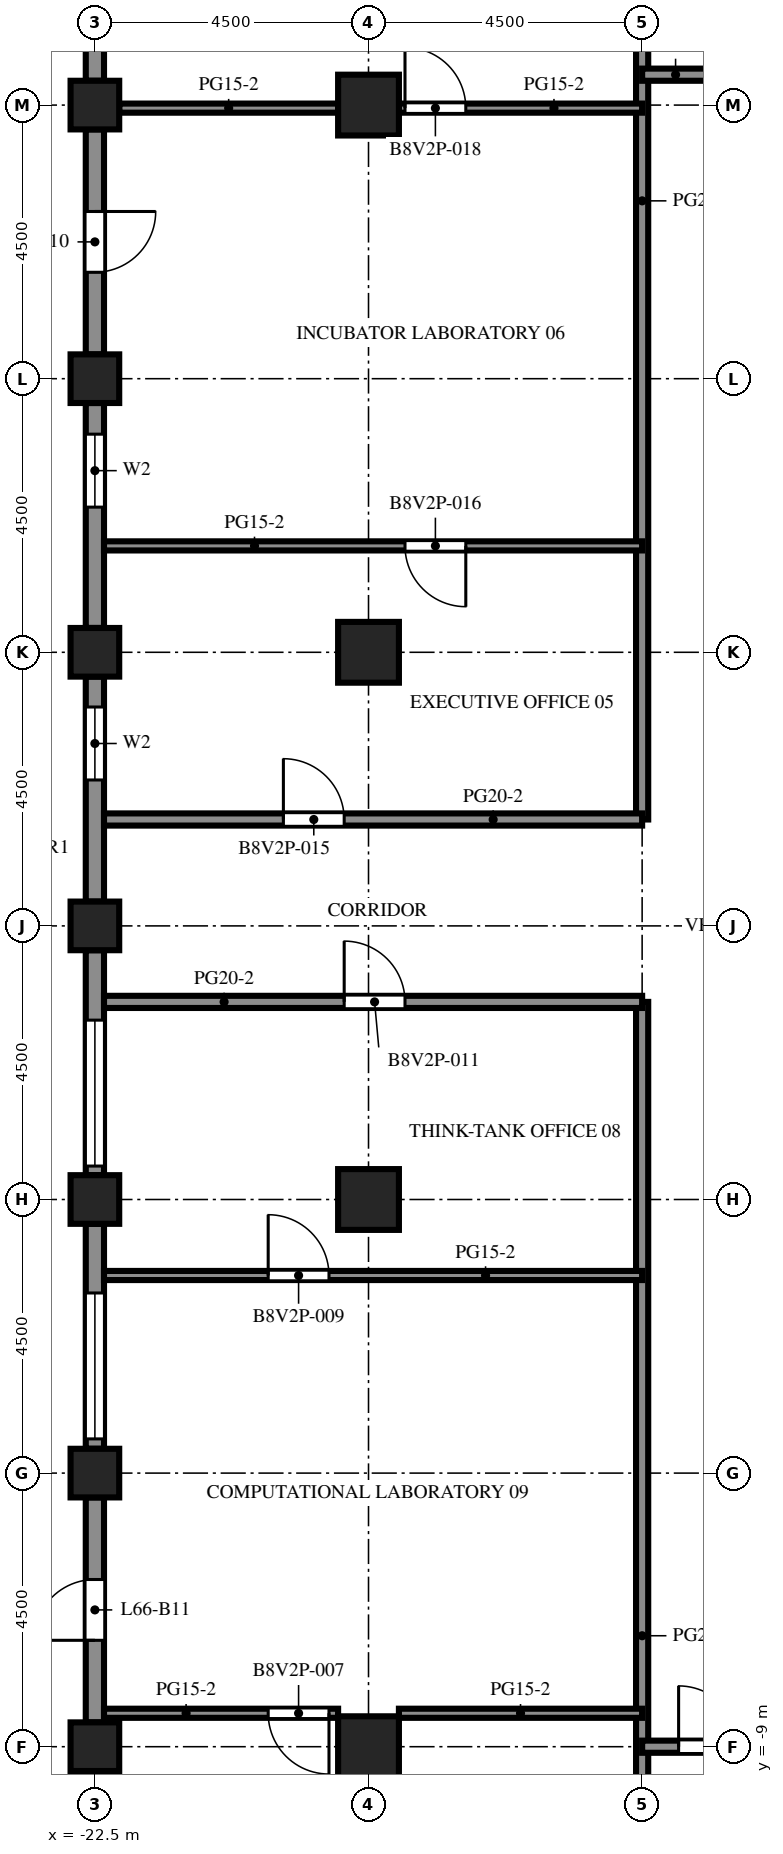
"""IFC4 building model, lengths in metres.
Left out: names, types, materials, properties, quantities, classifications, styles, units other than length and angle.
Written with IfcOpenShell. Run it as: python <this file> out.ifc"""

import sys

from ifc_helpers import new_model, si_unit, direction, frame, frame_2d, origin, origin_2d, place, context, subcontext, project, spatial, rectangle, extrude, element, fill, save


model = new_model("IFC4")
c1 = context("Model", 3, precision=1e-05, world=origin(), true_north=direction((0.0, 1.0)))
c2 = subcontext(c1, "Body", "Model", "MODEL_VIEW")
j1 = project(units=[si_unit("LENGTHUNIT", "METRE"), si_unit("PLANEANGLEUNIT", "RADIAN")], contexts=[c1])
p1 = place(None, origin())
s1 = spatial("IfcSite", under=j1, at=p1, CompositionType="ELEMENT")
p2 = place(p1, origin())
s2 = spatial("IfcBuilding", under=s1, at=p2, CompositionType="ELEMENT")
p3 = place(p2, frame((0.0, 0.0, 290.9)))
s3 = spatial("IfcBuildingStorey", under=s2, at=p3, CompositionType="ELEMENT", Elevation=290.9)
for number, where, z_axis, x_axis in (
    (1, (-22.5, -9.0, 0.0), (0.0, 0.0, 1.0), (1.0, 0.0, 0.0)),
    (2, (-22.5, -4.5, 0.0), (0.0, 0.0, 1.0), (1.0, 0.0, 0.0)),
    (3, (-22.5, 0.0, 0.0), (0.0, 0.0, 1.0), (1.0, 0.0, 0.0)),
    (4, (-22.5, 4.5, 0.0), (0.0, 0.0, 1.0), (1.0, 0.0, 0.0)),
    (5, (-22.5, 9.0, 0.0), (0.0, 0.0, 1.0), (1.0, 0.0, 0.0)),
    (6, (-22.5, 13.5, 0.0), (0.0, 0.0, 1.0), (1.0, 0.0, 0.0)),
    (7, (-22.5, 18.0, 0.0), (0.0, 0.0, 1.0), (1.0, 0.0, 0.0)),
):
    element("IfcColumn", number, at=place(p3, frame(where, z_axis=z_axis, x_axis=x_axis)), inside=s3, PredefinedType="COLUMN", context=c2, shape_type="SweptSolid", body=[
        extrude(rectangle(XDim=0.8, YDim=0.8, at=origin_2d()), origin(), (0.0, 0.0, 1.0), 4.1),
    ])
for number, where, z_axis, x_axis in (
    (8, (-18.0, -9.0, 0.0), (0.0, 0.0, 1.0), (1.0, 0.0, 0.0)),
    (9, (-18.0, 0.0, 0.0), (0.0, 0.0, 1.0), (1.0, 0.0, 0.0)),
    (10, (-18.0, 9.0, 0.0), (0.0, 0.0, 1.0), (1.0, 0.0, 0.0)),
    (11, (-18.0, 18.0, 0.0), (0.0, 0.0, 1.0), (1.0, 0.0, 0.0)),
):
    element("IfcColumn", number, at=place(p3, frame(where, z_axis=z_axis, x_axis=x_axis)), inside=s3, PredefinedType="COLUMN", context=c2, shape_type="SweptSolid", body=[
        extrude(rectangle(XDim=1.0, YDim=1.0, at=origin_2d()), origin(), (0.0, 0.0, 1.0), 4.1),
    ])
p4 = place(p3, frame((-22.5, 18.4, 0.0), z_axis=(0.0, 0.0, 1.0), x_axis=(0.0, 1.0, 0.0)))
e12 = element("IfcWall", 12, at=p4, inside=s3, PredefinedType="SOLIDWALL", context=c2, shape_type="SweptSolid", body=[
    extrude(rectangle(XDim=3.7, YDim=0.3, at=frame_2d((1.85, 0.0))), origin(), (0.0, 0.0, 1.0), 2.7),
])
p5 = place(p4, frame((0.65, 0.0, 0.8)))
e13 = element("IfcOpeningElement", 13, at=p5, cuts=e12, PredefinedType="OPENING", context=c2, shape_type="SweptSolid", body=[
    extrude(rectangle(XDim=2.4, YDim=1.7, at=frame_2d((1.2, 0.85))), frame((0.0, 0.16, 0.0), z_axis=(0.0, -1.0, 0.0), x_axis=(1.0, 0.0, 0.0)), (0.0, 0.0, 1.0), 0.32),
])
p6 = place(p3, frame((-22.5, 13.9, 0.0), z_axis=(0.0, 0.0, 1.0), x_axis=(0.0, 1.0, 0.0)))
e14 = element("IfcWall", 14, at=p6, inside=s3, PredefinedType="SOLIDWALL", context=c2, shape_type="SweptSolid", body=[
    extrude(rectangle(XDim=3.7, YDim=0.3, at=frame_2d((1.85, 0.0))), origin(), (0.0, 0.0, 1.0), 2.7),
])
p7 = place(p6, frame((1.35, 0.0, 0.0)))
e15 = element("IfcOpeningElement", 15, at=p7, cuts=e14, PredefinedType="OPENING", context=c2, shape_type="SweptSolid", body=[
    extrude(rectangle(XDim=1.0, YDim=2.2, at=frame_2d((0.5, 1.1))), frame((0.0, 0.16, 0.0), z_axis=(0.0, -1.0, 0.0), x_axis=(1.0, 0.0, 0.0)), (0.0, 0.0, 1.0), 0.32),
])
p8 = place(p3, frame((-22.5, 9.4, 0.0), z_axis=(0.0, 0.0, 1.0), x_axis=(0.0, 1.0, 0.0)))
e16 = element("IfcWall", 16, at=p8, inside=s3, PredefinedType="SOLIDWALL", context=c2, shape_type="SweptSolid", body=[
    extrude(rectangle(XDim=3.7, YDim=0.3, at=frame_2d((1.85, 0.0))), origin(), (0.0, 0.0, 1.0), 2.7),
])
p9 = place(p8, frame((1.988, 0.0, 0.8)))
e17 = element("IfcOpeningElement", 17, at=p9, cuts=e16, PredefinedType="OPENING", context=c2, shape_type="SweptSolid", body=[
    extrude(rectangle(XDim=1.2, YDim=1.7, at=frame_2d((0.6, 0.85))), frame((0.0, 0.16, 0.0), z_axis=(0.0, -1.0, 0.0), x_axis=(1.0, 0.0, 0.0)), (0.0, 0.0, 1.0), 0.32),
])
p10 = place(p3, frame((-22.5, 4.9, 0.0), z_axis=(0.0, 0.0, 1.0), x_axis=(0.0, 1.0, 0.0)))
e18 = element("IfcWall", 18, at=p10, inside=s3, PredefinedType="SOLIDWALL", context=c2, shape_type="SweptSolid", body=[
    extrude(rectangle(XDim=3.7, YDim=0.3, at=frame_2d((1.85, 0.0))), origin(), (0.0, 0.0, 1.0), 2.7),
])
p11 = place(p10, frame((2.0, 0.0, 0.8)))
e19 = element("IfcOpeningElement", 19, at=p11, cuts=e18, PredefinedType="OPENING", context=c2, shape_type="SweptSolid", body=[
    extrude(rectangle(XDim=1.2, YDim=1.7, at=frame_2d((0.6, 0.85))), frame((0.0, 0.16, 0.0), z_axis=(0.0, -1.0, 0.0), x_axis=(1.0, 0.0, 0.0)), (0.0, 0.0, 1.0), 0.32),
])
p12 = place(p3, frame((-22.5, 0.4, 0.0), z_axis=(0.0, 0.0, 1.0), x_axis=(0.0, 1.0, 0.0)))
e20 = element("IfcWall", 20, at=p12, inside=s3, PredefinedType="SOLIDWALL", context=c2, shape_type="SweptSolid", body=[
    extrude(rectangle(XDim=3.7, YDim=0.3, at=frame_2d((1.85, 0.0))), origin(), (0.0, 0.0, 1.0), 2.7),
])
p13 = place(p12, frame((0.15, 0.0, 0.8)))
e21 = element("IfcOpeningElement", 21, at=p13, cuts=e20, PredefinedType="OPENING", context=c2, shape_type="SweptSolid", body=[
    extrude(rectangle(XDim=2.4, YDim=1.7, at=frame_2d((1.2, 0.85))), frame((0.0, 0.16, 0.0), z_axis=(0.0, -1.0, 0.0), x_axis=(1.0, 0.0, 0.0)), (0.0, 0.0, 1.0), 0.32),
])
p14 = place(p3, frame((-22.5, -4.1, 0.0), z_axis=(0.0, 0.0, 1.0), x_axis=(0.0, 1.0, 0.0)))
e22 = element("IfcWall", 22, at=p14, inside=s3, PredefinedType="SOLIDWALL", context=c2, shape_type="SweptSolid", body=[
    extrude(rectangle(XDim=3.7, YDim=0.3, at=frame_2d((1.85, 0.0))), origin(), (0.0, 0.0, 1.0), 2.7),
])
p15 = place(p14, frame((0.163, 0.0, 0.8)))
e23 = element("IfcOpeningElement", 23, at=p15, cuts=e22, PredefinedType="OPENING", context=c2, shape_type="SweptSolid", body=[
    extrude(rectangle(XDim=2.4, YDim=1.7, at=frame_2d((1.2, 0.85))), frame((0.0, 0.16, 0.0), z_axis=(0.0, -1.0, 0.0), x_axis=(1.0, 0.0, 0.0)), (0.0, 0.0, 1.0), 0.32),
])
p16 = place(p3, frame((-22.5, -8.6, 0.0), z_axis=(0.0, 0.0, 1.0), x_axis=(0.0, 1.0, 0.0)))
e24 = element("IfcWall", 24, at=p16, inside=s3, PredefinedType="SOLIDWALL", context=c2, shape_type="SweptSolid", body=[
    extrude(rectangle(XDim=3.7, YDim=0.3, at=frame_2d((1.85, 0.0))), origin(), (0.0, 0.0, 1.0), 2.7),
])
p17 = place(p16, frame((1.35, 0.0, 0.0)))
e25 = element("IfcOpeningElement", 25, at=p17, cuts=e24, PredefinedType="OPENING", context=c2, shape_type="SweptSolid", body=[
    extrude(rectangle(XDim=1.0, YDim=2.2, at=frame_2d((0.5, 1.1))), frame((0.0, 0.16, 0.0), z_axis=(0.0, -1.0, 0.0), x_axis=(1.0, 0.0, 0.0)), (0.0, 0.0, 1.0), 0.32),
])
p18 = place(p3, frame((-22.5, -13.1, 0.0), z_axis=(0.0, 0.0, 1.0), x_axis=(0.0, 1.0, 0.0)))
e26 = element("IfcWall", 26, at=p18, inside=s3, PredefinedType="SOLIDWALL", context=c2, shape_type="SweptSolid", body=[
    extrude(rectangle(XDim=3.7, YDim=0.3, at=frame_2d((1.85, 0.0))), origin(), (0.0, 0.0, 1.0), 2.7),
])
p19 = place(p18, frame((0.65, 0.0, 0.8)))
e27 = element("IfcOpeningElement", 27, at=p19, cuts=e26, PredefinedType="OPENING", context=c2, shape_type="SweptSolid", body=[
    extrude(rectangle(XDim=2.4, YDim=1.7, at=frame_2d((1.2, 0.85))), frame((0.0, 0.16, 0.0), z_axis=(0.0, -1.0, 0.0), x_axis=(1.0, 0.0, 0.0)), (0.0, 0.0, 1.0), 0.32),
])
p20 = place(p3, frame((-13.5, -17.6, 0.0), z_axis=(0.0, 0.0, 1.0), x_axis=(0.0, 1.0, 0.0)))
e28 = element("IfcWall", 28, at=p20, inside=s3, PredefinedType="PARTITIONING", context=c2, shape_type="SweptSolid", body=[
    extrude(rectangle(XDim=20.85, YDim=0.2, at=frame_2d((10.425, 0.0))), origin(), (0.0, 0.0, 1.0), 3.5),
])
p21 = place(p3, frame((-13.5, 6.25, 0.0), z_axis=(0.0, 0.0, 1.0), x_axis=(0.0, 1.0, 0.0)))
e29 = element("IfcWall", 29, at=p21, inside=s3, PredefinedType="PARTITIONING", context=c2, shape_type="SweptSolid", body=[
    extrude(rectangle(XDim=20.35, YDim=0.2, at=frame_2d((10.175, 0.0))), origin(), (0.0, 0.0, 1.0), 3.5),
])
p22 = place(p3, frame((-10.5, -9.0, 0.0), z_axis=(0.0, 0.0, 1.0), x_axis=(-1.0, 0.0, 0.0)))
e30 = element("IfcWall", 30, at=p22, inside=s3, PredefinedType="PARTITIONING", context=c2, shape_type="SweptSolid", body=[
    extrude(rectangle(XDim=3.0, YDim=0.2, at=frame_2d((1.5, 0.0))), origin(), (0.0, 0.0, 1.0), 3.5),
])
p23 = place(p22, frame((1.4, 0.0, 0.0)))
e31 = element("IfcOpeningElement", 31, at=p23, cuts=e30, PredefinedType="OPENING", context=c2, shape_type="SweptSolid", body=[
    extrude(rectangle(XDim=1.0, YDim=2.1, at=frame_2d((0.5, 1.05))), frame((0.0, 0.11, 0.0), z_axis=(0.0, -1.0, 0.0), x_axis=(1.0, 0.0, 0.0)), (0.0, 0.0, 1.0), 0.22),
])
p24 = place(p3, frame((-18.5, -8.45, 0.0), z_axis=(0.0, 0.0, 1.0), x_axis=(-1.0, 0.0, 0.0)))
e32 = element("IfcWall", 32, at=p24, inside=s3, PredefinedType="PARTITIONING", context=c2, shape_type="SweptSolid", body=[
    extrude(rectangle(XDim=3.85, YDim=0.15, at=frame_2d((1.925, 0.0))), origin(), (0.0, 0.0, 1.0), 3.5),
])
p25 = place(p24, frame((0.15, 0.0, 0.0)))
e33 = element("IfcOpeningElement", 33, at=p25, cuts=e32, PredefinedType="OPENING", context=c2, shape_type="SweptSolid", body=[
    extrude(rectangle(XDim=1.0, YDim=2.1, at=frame_2d((0.5, 1.05))), frame((0.0, 0.085, 0.0), z_axis=(0.0, -1.0, 0.0), x_axis=(1.0, 0.0, 0.0)), (0.0, 0.0, 1.0), 0.17),
])
p26 = place(p3, frame((-17.5, -8.45, 0.0), z_axis=(0.0, 0.0, 1.0), x_axis=(1.0, 0.0, 0.0)))
e34 = element("IfcWall", 34, at=p26, inside=s3, PredefinedType="PARTITIONING", context=c2, shape_type="SweptSolid", body=[
    extrude(rectangle(XDim=4.0, YDim=0.15, at=frame_2d((2.0, 0.0))), origin(), (0.0, 0.0, 1.0), 3.5),
])
p27 = place(p3, frame((-13.5, -1.25, 0.0), z_axis=(0.0, 0.0, 1.0), x_axis=(-1.0, 0.0, 0.0)))
e35 = element("IfcWall", 35, at=p27, inside=s3, PredefinedType="PARTITIONING", context=c2, shape_type="SweptSolid", body=[
    extrude(rectangle(XDim=8.85, YDim=0.15, at=frame_2d((4.425, 0.0))), origin(), (0.0, 0.0, 1.0), 3.5),
])
p28 = place(p27, frame((5.15, 0.0, 0.0)))
e36 = element("IfcOpeningElement", 36, at=p28, cuts=e35, PredefinedType="OPENING", context=c2, shape_type="SweptSolid", body=[
    extrude(rectangle(XDim=1.0, YDim=2.1, at=frame_2d((0.5, 1.05))), frame((0.0, 0.085, 0.0), z_axis=(0.0, -1.0, 0.0), x_axis=(1.0, 0.0, 0.0)), (0.0, 0.0, 1.0), 0.17),
])
p29 = place(p3, frame((-13.5, 3.25, 0.0), z_axis=(0.0, 0.0, 1.0), x_axis=(-1.0, 0.0, 0.0)))
e37 = element("IfcWall", 37, at=p29, inside=s3, PredefinedType="PARTITIONING", context=c2, shape_type="SweptSolid", body=[
    extrude(rectangle(XDim=8.85, YDim=0.2, at=frame_2d((4.425, 0.0))), origin(), (0.0, 0.0, 1.0), 3.5),
])
p30 = place(p29, frame((3.9, 0.0, 0.0)))
e38 = element("IfcOpeningElement", 38, at=p30, cuts=e37, PredefinedType="OPENING", context=c2, shape_type="SweptSolid", body=[
    extrude(rectangle(XDim=1.0, YDim=2.1, at=frame_2d((0.5, 1.05))), frame((0.0, 0.11, 0.0), z_axis=(0.0, -1.0, 0.0), x_axis=(1.0, 0.0, 0.0)), (0.0, 0.0, 1.0), 0.22),
])
p31 = place(p3, frame((-22.35, 6.25, 0.0), z_axis=(0.0, 0.0, 1.0), x_axis=(1.0, 0.0, 0.0)))
e39 = element("IfcWall", 39, at=p31, inside=s3, PredefinedType="PARTITIONING", context=c2, shape_type="SweptSolid", body=[
    extrude(rectangle(XDim=8.85, YDim=0.2, at=frame_2d((4.425, 0.0))), origin(), (0.0, 0.0, 1.0), 3.5),
])
p32 = place(p31, frame((2.95, 0.0, 0.0)))
e40 = element("IfcOpeningElement", 40, at=p32, cuts=e39, PredefinedType="OPENING", context=c2, shape_type="SweptSolid", body=[
    extrude(rectangle(XDim=1.0, YDim=2.1, at=frame_2d((0.5, 1.05))), frame((0.0, 0.11, 0.0), z_axis=(0.0, -1.0, 0.0), x_axis=(1.0, 0.0, 0.0)), (0.0, 0.0, 1.0), 0.22),
])
p33 = place(p3, frame((-22.35, 10.75, 0.0), z_axis=(0.0, 0.0, 1.0), x_axis=(1.0, 0.0, 0.0)))
e41 = element("IfcWall", 41, at=p33, inside=s3, PredefinedType="PARTITIONING", context=c2, shape_type="SweptSolid", body=[
    extrude(rectangle(XDim=8.85, YDim=0.15, at=frame_2d((4.425, 0.0))), origin(), (0.0, 0.0, 1.0), 3.5),
])
p34 = place(p33, frame((4.95, 0.0, 0.0)))
e42 = element("IfcOpeningElement", 42, at=p34, cuts=e41, PredefinedType="OPENING", context=c2, shape_type="SweptSolid", body=[
    extrude(rectangle(XDim=1.0, YDim=2.1, at=frame_2d((0.5, 1.05))), frame((0.0, 0.085, 0.0), z_axis=(0.0, -1.0, 0.0), x_axis=(1.0, 0.0, 0.0)), (0.0, 0.0, 1.0), 0.17),
])
p35 = place(p3, frame((-22.1, 17.95, 0.0), z_axis=(0.0, 0.0, 1.0), x_axis=(1.0, 0.0, 0.0)))
e43 = element("IfcWall", 43, at=p35, inside=s3, PredefinedType="PARTITIONING", context=c2, shape_type="SweptSolid", body=[
    extrude(rectangle(XDim=3.6, YDim=0.15, at=frame_2d((1.8, 0.0))), origin(), (0.0, 0.0, 1.0), 3.5),
])
p36 = place(p3, frame((-17.5, 17.95, 0.0), z_axis=(0.0, 0.0, 1.0), x_axis=(1.0, 0.0, 0.0)))
e44 = element("IfcWall", 44, at=p36, inside=s3, PredefinedType="PARTITIONING", context=c2, shape_type="SweptSolid", body=[
    extrude(rectangle(XDim=4.0, YDim=0.15, at=frame_2d((2.0, 0.0))), origin(), (0.0, 0.0, 1.0), 3.5),
])
p37 = place(p36, frame((0.1, 0.0, 0.0)))
e45 = element("IfcOpeningElement", 45, at=p37, cuts=e44, PredefinedType="OPENING", context=c2, shape_type="SweptSolid", body=[
    extrude(rectangle(XDim=1.0, YDim=2.1, at=frame_2d((0.5, 1.05))), frame((0.0, 0.085, 0.0), z_axis=(0.0, -1.0, 0.0), x_axis=(1.0, 0.0, 0.0)), (0.0, 0.0, 1.0), 0.17),
])
p38 = place(p3, frame((-13.5, 18.5, 0.0), z_axis=(0.0, 0.0, 1.0), x_axis=(1.0, 0.0, 0.0)))
e46 = element("IfcWall", 46, at=p38, inside=s3, PredefinedType="PARTITIONING", context=c2, shape_type="SweptSolid", body=[
    extrude(rectangle(XDim=3.0, YDim=0.2, at=frame_2d((1.5, 0.0))), origin(), (0.0, 0.0, 1.0), 3.5),
])
p39 = place(p38, frame((1.1, 0.0, 0.0)))
e47 = element("IfcOpeningElement", 47, at=p39, cuts=e46, PredefinedType="OPENING", context=c2, shape_type="SweptSolid", body=[
    extrude(rectangle(XDim=1.0, YDim=2.1, at=frame_2d((0.5, 1.05))), frame((0.0, 0.11, 0.0), z_axis=(0.0, -1.0, 0.0), x_axis=(1.0, 0.0, 0.0)), (0.0, 0.0, 1.0), 0.22),
])
p40 = place(p7, origin())
e48 = element("IfcDoor", 48, at=p40, inside=s3, OperationType="SINGLE_SWING_RIGHT", PredefinedType="DOOR", context=c2, shape_type="SweptSolid", body=[
    extrude(rectangle(XDim=1.0, YDim=2.2, at=frame_2d((0.5, 1.1))), frame((0.0, 0.025, 0.0), z_axis=(0.0, -1.0, 0.0), x_axis=(1.0, 0.0, 0.0)), (0.0, 0.0, 1.0), 0.05),
])
fill(e15, e48)
p41 = place(p9, origin())
e49 = element("IfcWindow", 49, at=p41, inside=s3, PartitioningType="SINGLE_PANEL", PredefinedType="WINDOW", context=c2, shape_type="SweptSolid", body=[
    extrude(rectangle(XDim=1.2, YDim=1.7, at=frame_2d((0.6, 0.85))), frame((0.0, 0.03, 0.0), z_axis=(0.0, -1.0, 0.0), x_axis=(1.0, 0.0, 0.0)), (0.0, 0.0, 1.0), 0.06),
])
fill(e17, e49)
p42 = place(p11, origin())
e50 = element("IfcWindow", 50, at=p42, inside=s3, PartitioningType="SINGLE_PANEL", PredefinedType="WINDOW", context=c2, shape_type="SweptSolid", body=[
    extrude(rectangle(XDim=1.2, YDim=1.7, at=frame_2d((0.6, 0.85))), frame((0.0, 0.03, 0.0), z_axis=(0.0, -1.0, 0.0), x_axis=(1.0, 0.0, 0.0)), (0.0, 0.0, 1.0), 0.06),
])
fill(e19, e50)
p43 = place(p13, origin())
e51 = element("IfcWindow", 51, at=p43, inside=s3, PartitioningType="SINGLE_PANEL", PredefinedType="WINDOW", context=c2, shape_type="SweptSolid", body=[
    extrude(rectangle(XDim=2.4, YDim=1.7, at=frame_2d((1.2, 0.85))), frame((0.0, 0.03, 0.0), z_axis=(0.0, -1.0, 0.0), x_axis=(1.0, 0.0, 0.0)), (0.0, 0.0, 1.0), 0.06),
])
fill(e21, e51)
p44 = place(p15, origin())
e52 = element("IfcWindow", 52, at=p44, inside=s3, PartitioningType="SINGLE_PANEL", PredefinedType="WINDOW", context=c2, shape_type="SweptSolid", body=[
    extrude(rectangle(XDim=2.4, YDim=1.7, at=frame_2d((1.2, 0.85))), frame((0.0, 0.03, 0.0), z_axis=(0.0, -1.0, 0.0), x_axis=(1.0, 0.0, 0.0)), (0.0, 0.0, 1.0), 0.06),
])
fill(e23, e52)
p45 = place(p17, origin())
e53 = element("IfcDoor", 53, at=p45, inside=s3, OperationType="SINGLE_SWING_LEFT", PredefinedType="DOOR", context=c2, shape_type="SweptSolid", body=[
    extrude(rectangle(XDim=1.0, YDim=2.2, at=frame_2d((0.5, 1.1))), frame((0.0, 0.025, 0.0), z_axis=(0.0, -1.0, 0.0), x_axis=(1.0, 0.0, 0.0)), (0.0, 0.0, 1.0), 0.05),
])
fill(e25, e53)
p46 = place(p23, origin())
e54 = element("IfcDoor", 54, at=p46, inside=s3, OperationType="SINGLE_SWING_RIGHT", PredefinedType="DOOR", context=c2, shape_type="SweptSolid", body=[
    extrude(rectangle(XDim=1.0, YDim=2.1, at=frame_2d((0.5, 1.05))), frame((0.0, 0.025, 0.0), z_axis=(0.0, -1.0, 0.0), x_axis=(1.0, 0.0, 0.0)), (0.0, 0.0, 1.0), 0.05),
])
fill(e31, e54)
p47 = place(p25, origin())
e55 = element("IfcDoor", 55, at=p47, inside=s3, OperationType="SINGLE_SWING_LEFT", PredefinedType="DOOR", context=c2, shape_type="SweptSolid", body=[
    extrude(rectangle(XDim=1.0, YDim=2.1, at=frame_2d((0.5, 1.05))), frame((0.0, 0.025, 0.0), z_axis=(0.0, -1.0, 0.0), x_axis=(1.0, 0.0, 0.0)), (0.0, 0.0, 1.0), 0.05),
])
fill(e33, e55)
p48 = place(p28, origin())
e56 = element("IfcDoor", 56, at=p48, inside=s3, OperationType="SINGLE_SWING_RIGHT", PredefinedType="DOOR", context=c2, shape_type="SweptSolid", body=[
    extrude(rectangle(XDim=1.0, YDim=2.1, at=frame_2d((0.5, 1.05))), frame((0.0, 0.025, 0.0), z_axis=(0.0, -1.0, 0.0), x_axis=(1.0, 0.0, 0.0)), (0.0, 0.0, 1.0), 0.05),
])
fill(e36, e56)
p49 = place(p30, origin())
e57 = element("IfcDoor", 57, at=p49, inside=s3, OperationType="SINGLE_SWING_RIGHT", PredefinedType="DOOR", context=c2, shape_type="SweptSolid", body=[
    extrude(rectangle(XDim=1.0, YDim=2.1, at=frame_2d((0.5, 1.05))), frame((0.0, 0.025, 0.0), z_axis=(0.0, -1.0, 0.0), x_axis=(1.0, 0.0, 0.0)), (0.0, 0.0, 1.0), 0.05),
])
fill(e38, e57)
p50 = place(p32, origin())
e58 = element("IfcDoor", 58, at=p50, inside=s3, OperationType="SINGLE_SWING_LEFT", PredefinedType="DOOR", context=c2, shape_type="SweptSolid", body=[
    extrude(rectangle(XDim=1.0, YDim=2.1, at=frame_2d((0.5, 1.05))), frame((0.0, 0.025, 0.0), z_axis=(0.0, -1.0, 0.0), x_axis=(1.0, 0.0, 0.0)), (0.0, 0.0, 1.0), 0.05),
])
fill(e40, e58)
p51 = place(p34, origin())
e59 = element("IfcDoor", 59, at=p51, inside=s3, OperationType="SINGLE_SWING_RIGHT", PredefinedType="DOOR", context=c2, shape_type="SweptSolid", body=[
    extrude(rectangle(XDim=1.0, YDim=2.1, at=frame_2d((0.5, 1.05))), frame((0.0, 0.025, 0.0), z_axis=(0.0, -1.0, 0.0), x_axis=(1.0, 0.0, 0.0)), (0.0, 0.0, 1.0), 0.05),
])
fill(e42, e59)
p52 = place(p37, origin())
e60 = element("IfcDoor", 60, at=p52, inside=s3, OperationType="SINGLE_SWING_LEFT", PredefinedType="DOOR", context=c2, shape_type="SweptSolid", body=[
    extrude(rectangle(XDim=1.0, YDim=2.1, at=frame_2d((0.5, 1.05))), frame((0.0, 0.025, 0.0), z_axis=(0.0, -1.0, 0.0), x_axis=(1.0, 0.0, 0.0)), (0.0, 0.0, 1.0), 0.05),
])
fill(e45, e60)
save(model, sys.argv[1])
